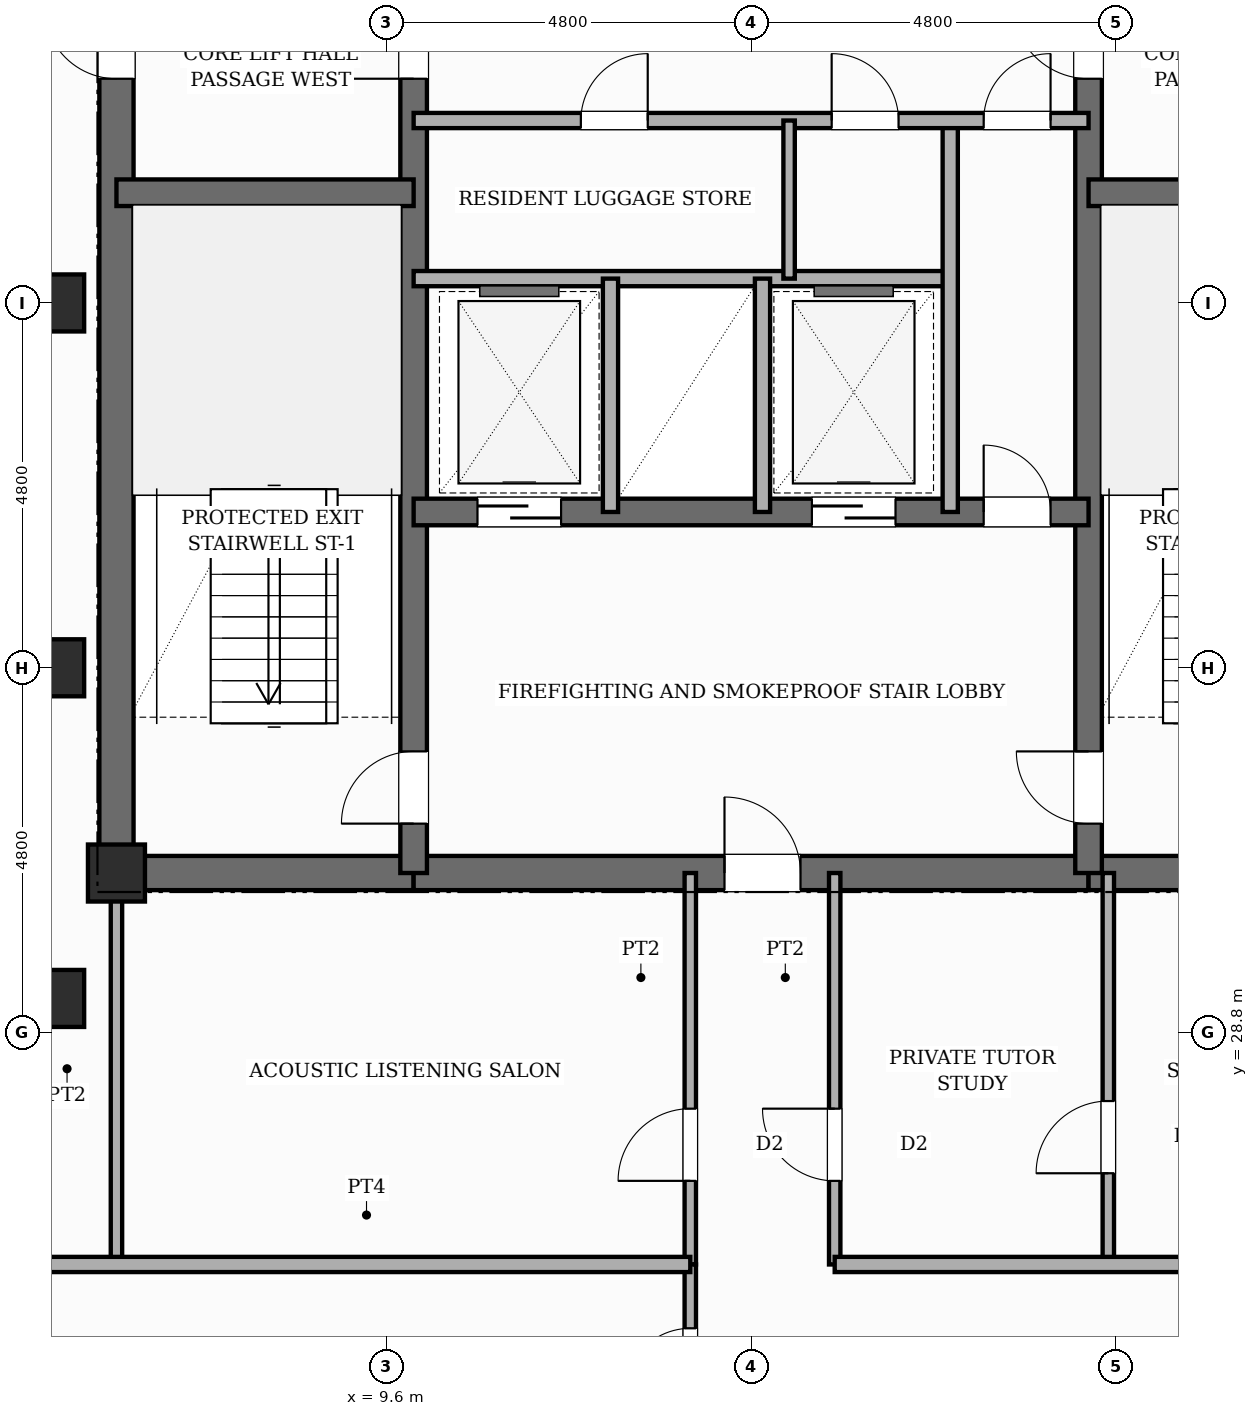
"""IFC4 building model, lengths in metres.
Left out: names, types, materials, properties, quantities, classifications, styles, units other than length and angle.
Written with IfcOpenShell. Run it as: python <this file> out.ifc"""

import sys

from ifc_helpers import new_model, si_unit, direction, frame, frame_2d, origin, origin_2d, place, context, subcontext, project, spatial, rectangle, extrude, element, fill, save


model = new_model("IFC4")
c1 = context("Model", 3, precision=1e-05, world=origin(), true_north=direction((0.0, 1.0)))
c2 = subcontext(c1, "Body", "Model", "MODEL_VIEW")
j1 = project(units=[si_unit("LENGTHUNIT", "METRE"), si_unit("PLANEANGLEUNIT", "RADIAN")], contexts=[c1])
p1 = place(None, origin())
s1 = spatial("IfcSite", under=j1, at=p1, CompositionType="ELEMENT")
p2 = place(p1, origin())
s2 = spatial("IfcBuilding", under=s1, at=p2, CompositionType="ELEMENT")
p3 = place(p2, frame((0.0, 0.0, 278.5)))
s3 = spatial("IfcBuildingStorey", under=s2, at=p3, CompositionType="ELEMENT", Elevation=278.5)
p4 = place(p3, frame((6.05, 30.675, 0.0), z_axis=(0.0, 0.0, 1.0), x_axis=(0.0, 1.0, 0.0)))
e1 = element("IfcWall", 1, at=p4, inside=s3, PredefinedType="SHEAR", context=c2, shape_type="SweptSolid", body=[
    extrude(rectangle(XDim=15.35, YDim=0.45, at=frame_2d((7.675, 0.0))), origin(), (0.0, 0.0, 1.0), 4.3),
])
p5 = place(p4, frame((10.675, 0.0, 0.0)))
e2 = element("IfcOpeningElement", 2, at=p5, cuts=e1, PredefinedType="OPENING", context=c2, shape_type="SweptSolid", body=[
    extrude(rectangle(XDim=0.95, YDim=2.15, at=frame_2d((0.475, 1.075))), frame((0.0, 0.235, 0.0), z_axis=(0.0, -1.0, 0.0), x_axis=(1.0, 0.0, 0.0)), (0.0, 0.0, 1.0), 0.47),
])
p6 = place(p3, frame((6.05, 30.9, 0.0), z_axis=(0.0, 0.0, 1.0), x_axis=(1.0, 0.0, 0.0)))
e3 = element("IfcWall", 3, at=p6, inside=s3, PredefinedType="SHEAR", context=c2, shape_type="SweptSolid", body=[
    extrude(rectangle(XDim=3.91, YDim=0.45, at=frame_2d((1.955, 0.0))), origin(), (0.0, 0.0, 1.0), 4.3),
])
p7 = place(p3, frame((9.96, 30.9, 0.0), z_axis=(0.0, 0.0, 1.0), x_axis=(1.0, 0.0, 0.0)))
e4 = element("IfcWall", 4, at=p7, inside=s3, PredefinedType="SHEAR", context=c2, shape_type="SweptSolid", body=[
    extrude(rectangle(XDim=8.88, YDim=0.45, at=frame_2d((4.44, 0.0))), origin(), (0.0, 0.0, 1.0), 4.3),
])
p8 = place(p7, frame((4.09, 0.0, 0.0)))
e5 = element("IfcOpeningElement", 5, at=p8, cuts=e4, PredefinedType="OPENING", context=c2, shape_type="SweptSolid", body=[
    extrude(rectangle(XDim=1.0, YDim=2.15, at=frame_2d((0.5, 1.075))), frame((0.0, 0.235, 0.0), z_axis=(0.0, -1.0, 0.0), x_axis=(1.0, 0.0, 0.0)), (0.0, 0.0, 1.0), 0.47),
])
p9 = place(p3, frame((18.84, 30.9, 0.0), z_axis=(0.0, 0.0, 1.0), x_axis=(1.0, 0.0, 0.0)))
e6 = element("IfcWall", 6, at=p9, inside=s3, PredefinedType="SHEAR", context=c2, shape_type="SweptSolid", body=[
    extrude(rectangle(XDim=3.91, YDim=0.45, at=frame_2d((1.955, 0.0))), origin(), (0.0, 0.0, 1.0), 4.3),
])
p10 = place(p3, frame((9.96, 30.9, 0.0), z_axis=(0.0, 0.0, 1.0), x_axis=(0.0, 1.0, 0.0)))
e7 = element("IfcWall", 7, at=p10, inside=s3, PredefinedType="SHEAR", context=c2, shape_type="SweptSolid", body=[
    extrude(rectangle(XDim=14.9, YDim=0.35, at=frame_2d((7.45, 0.0))), origin(), (0.0, 0.0, 1.0), 4.3),
])
p11 = place(p10, frame((0.65, 0.0, 0.0)))
e8 = element("IfcOpeningElement", 8, at=p11, cuts=e7, PredefinedType="OPENING", context=c2, shape_type="SweptSolid", body=[
    extrude(rectangle(XDim=0.95, YDim=2.1, at=frame_2d((0.475, 1.05))), frame((0.0, 0.185, 0.0), z_axis=(0.0, -1.0, 0.0), x_axis=(1.0, 0.0, 0.0)), (0.0, 0.0, 1.0), 0.37),
])
p12 = place(p10, frame((10.45, 0.0, 0.0)))
e9 = element("IfcOpeningElement", 9, at=p12, cuts=e7, PredefinedType="OPENING", context=c2, shape_type="SweptSolid", body=[
    extrude(rectangle(XDim=1.0, YDim=2.15, at=frame_2d((0.5, 1.075))), frame((0.0, 0.185, 0.0), z_axis=(0.0, -1.0, 0.0), x_axis=(1.0, 0.0, 0.0)), (0.0, 0.0, 1.0), 0.37),
])
p13 = place(p3, frame((18.84, 30.9, 0.0), z_axis=(0.0, 0.0, 1.0), x_axis=(0.0, 1.0, 0.0)))
e10 = element("IfcWall", 10, at=p13, inside=s3, PredefinedType="SHEAR", context=c2, shape_type="SweptSolid", body=[
    extrude(rectangle(XDim=14.9, YDim=0.35, at=frame_2d((7.45, 0.0))), origin(), (0.0, 0.0, 1.0), 4.3),
])
p14 = place(p13, frame((0.65, 0.0, 0.0)))
e11 = element("IfcOpeningElement", 11, at=p14, cuts=e10, PredefinedType="OPENING", context=c2, shape_type="SweptSolid", body=[
    extrude(rectangle(XDim=0.95, YDim=2.1, at=frame_2d((0.475, 1.05))), frame((0.0, 0.185, 0.0), z_axis=(0.0, -1.0, 0.0), x_axis=(1.0, 0.0, 0.0)), (0.0, 0.0, 1.0), 0.37),
])
p15 = place(p13, frame((10.45, 0.0, 0.0)))
e12 = element("IfcOpeningElement", 12, at=p15, cuts=e10, PredefinedType="OPENING", context=c2, shape_type="SweptSolid", body=[
    extrude(rectangle(XDim=1.0, YDim=2.15, at=frame_2d((0.5, 1.075))), frame((0.0, 0.185, 0.0), z_axis=(0.0, -1.0, 0.0), x_axis=(1.0, 0.0, 0.0)), (0.0, 0.0, 1.0), 0.37),
])
for number, where, z_axis, x_axis in (
    (13, (6.05, 39.85, 0.0), (0.0, 0.0, 1.0), (1.0, 0.0, 0.0)),
    (14, (18.84, 39.85, 0.0), (0.0, 0.0, 1.0), (1.0, 0.0, 0.0)),
):
    element("IfcWall", number, at=place(p3, frame(where, z_axis=z_axis, x_axis=x_axis)), inside=s3, PredefinedType="SHEAR", context=c2, shape_type="SweptSolid", body=[
        extrude(rectangle(XDim=3.91, YDim=0.35, at=frame_2d((1.955, 0.0))), origin(), (0.0, 0.0, 1.0), 4.3),
    ])
p16 = place(p3, frame((9.96, 35.65, 0.0), z_axis=(0.0, 0.0, 1.0), x_axis=(1.0, 0.0, 0.0)))
e15 = element("IfcWall", 15, at=p16, inside=s3, PredefinedType="SHEAR", context=c2, shape_type="SweptSolid", body=[
    extrude(rectangle(XDim=8.88, YDim=0.35, at=frame_2d((4.44, 0.0))), origin(), (0.0, 0.0, 1.0), 4.3),
])
p17 = place(p16, frame((0.84, 0.0, 0.0)))
e16 = element("IfcOpeningElement", 16, at=p17, cuts=e15, PredefinedType="OPENING", context=c2, shape_type="SweptSolid", body=[
    extrude(rectangle(XDim=1.1, YDim=2.15, at=frame_2d((0.55, 1.075))), frame((0.0, 0.185, 0.0), z_axis=(0.0, -1.0, 0.0), x_axis=(1.0, 0.0, 0.0)), (0.0, 0.0, 1.0), 0.37),
])
p18 = place(p16, frame((5.24, 0.0, 0.0)))
e17 = element("IfcOpeningElement", 17, at=p18, cuts=e15, PredefinedType="OPENING", context=c2, shape_type="SweptSolid", body=[
    extrude(rectangle(XDim=1.1, YDim=2.15, at=frame_2d((0.55, 1.075))), frame((0.0, 0.185, 0.0), z_axis=(0.0, -1.0, 0.0), x_axis=(1.0, 0.0, 0.0)), (0.0, 0.0, 1.0), 0.37),
])
p19 = place(p16, frame((7.5, 0.0, 0.0)))
e18 = element("IfcOpeningElement", 18, at=p19, cuts=e15, PredefinedType="OPENING", context=c2, shape_type="SweptSolid", body=[
    extrude(rectangle(XDim=0.88, YDim=2.1, at=frame_2d((0.44, 1.05))), frame((0.0, 0.185, 0.0), z_axis=(0.0, -1.0, 0.0), x_axis=(1.0, 0.0, 0.0)), (0.0, 0.0, 1.0), 0.37),
])
for number, where, z_axis, x_axis in (
    (19, (5.25, 29.25, 0.0), (0.0, 0.0, 1.0), (1.0, 0.0, 0.0)),
    (20, (5.25, 33.6, 0.0), (0.0, 0.0, 1.0), (1.0, 0.0, 0.0)),
    (21, (5.25, 38.4, 0.0), (0.0, 0.0, 1.0), (1.0, 0.0, 0.0)),
    (22, (6.05, 30.9, 0.0), (0.0, 0.0, 1.0), (1.0, 0.0, 0.0)),
):
    element("IfcColumn", number, at=place(p3, frame(where, z_axis=z_axis, x_axis=x_axis)), inside=s3, PredefinedType="COLUMN", context=c2, shape_type="SweptSolid", body=[
        extrude(rectangle(XDim=0.75, YDim=0.75, at=origin_2d()), origin(), (0.0, 0.0, 1.0), 4.3),
    ])
p20 = place(p3, frame((9.96, 38.72, 0.0), z_axis=(0.0, 0.0, 1.0), x_axis=(1.0, 0.0, 0.0)))
e23 = element("IfcWall", 23, at=p20, inside=s3, PredefinedType="POLYGONAL", context=c2, shape_type="SweptSolid", body=[
    extrude(rectangle(XDim=7.06, YDim=0.2, at=frame_2d((3.53, 0.0))), origin(), (0.0, 0.0, 1.0), 4.04),
])
for number, where, z_axis, x_axis in (
    (24, (12.55, 35.65, 0.0), (0.0, 0.0, 1.0), (0.0, 1.0, 0.0)),
    (25, (14.55, 35.65, 0.0), (0.0, 0.0, 1.0), (0.0, 1.0, 0.0)),
):
    element("IfcWall", number, at=place(p3, frame(where, z_axis=z_axis, x_axis=x_axis)), inside=s3, PredefinedType="POLYGONAL", context=c2, shape_type="SweptSolid", body=[
        extrude(rectangle(XDim=3.07, YDim=0.2, at=frame_2d((1.535, 0.0))), origin(), (0.0, 0.0, 1.0), 4.04),
    ])
p21 = place(p3, frame((17.02, 35.65, 0.0), z_axis=(0.0, 0.0, 1.0), x_axis=(0.0, 1.0, 0.0)))
e26 = element("IfcWall", 26, at=p21, inside=s3, PredefinedType="POLYGONAL", context=c2, shape_type="SweptSolid", body=[
    extrude(rectangle(XDim=5.15, YDim=0.2, at=frame_2d((2.575, 0.0))), origin(), (0.0, 0.0, 1.0), 4.04),
])
p22 = place(p3, frame((9.96, 40.8, 0.0), z_axis=(0.0, 0.0, 1.0), x_axis=(1.0, 0.0, 0.0)))
e27 = element("IfcWall", 27, at=p22, inside=s3, PredefinedType="POLYGONAL", context=c2, shape_type="SweptSolid", body=[
    extrude(rectangle(XDim=8.88, YDim=0.2, at=frame_2d((4.44, 0.0))), origin(), (0.0, 0.0, 1.0), 4.04),
])
p23 = place(p22, frame((7.5, 0.0, 0.0)))
e28 = element("IfcOpeningElement", 28, at=p23, cuts=e27, PredefinedType="OPENING", context=c2, shape_type="SweptSolid", body=[
    extrude(rectangle(XDim=0.88, YDim=2.1, at=frame_2d((0.44, 1.05))), frame((0.0, 0.11, 0.0), z_axis=(0.0, -1.0, 0.0), x_axis=(1.0, 0.0, 0.0)), (0.0, 0.0, 1.0), 0.22),
])
p24 = place(p22, frame((2.2, 0.0, 0.0)))
e29 = element("IfcOpeningElement", 29, at=p24, cuts=e27, PredefinedType="OPENING", context=c2, shape_type="SweptSolid", body=[
    extrude(rectangle(XDim=0.88, YDim=2.1, at=frame_2d((0.44, 1.05))), frame((0.0, 0.11, 0.0), z_axis=(0.0, -1.0, 0.0), x_axis=(1.0, 0.0, 0.0)), (0.0, 0.0, 1.0), 0.22),
])
p25 = place(p22, frame((5.5, 0.0, 0.0)))
e30 = element("IfcOpeningElement", 30, at=p25, cuts=e27, PredefinedType="OPENING", context=c2, shape_type="SweptSolid", body=[
    extrude(rectangle(XDim=0.88, YDim=2.1, at=frame_2d((0.44, 1.05))), frame((0.0, 0.11, 0.0), z_axis=(0.0, -1.0, 0.0), x_axis=(1.0, 0.0, 0.0)), (0.0, 0.0, 1.0), 0.22),
])
p26 = place(p3, frame((14.9, 38.72, 0.0), z_axis=(0.0, 0.0, 1.0), x_axis=(0.0, 1.0, 0.0)))
e31 = element("IfcWall", 31, at=p26, inside=s3, PredefinedType="PARTITIONING", context=c2, shape_type="SweptSolid", body=[
    extrude(rectangle(XDim=2.08, YDim=0.15, at=frame_2d((1.04, 0.0))), origin(), (0.0, 0.0, 1.0), 4.04),
])
p27 = place(p3, frame((13.6, 25.75, 0.0), z_axis=(0.0, 0.0, 1.0), x_axis=(0.0, 1.0, 0.0)))
e32 = element("IfcWall", 32, at=p27, inside=s3, PredefinedType="PARTITIONING", context=c2, shape_type="SweptSolid", body=[
    extrude(rectangle(XDim=5.15, YDim=0.15, at=frame_2d((2.575, 0.0))), origin(), (0.0, 0.0, 1.0), 4.04),
])
p28 = place(p27, frame((1.1, 0.0, 0.0)))
e33 = element("IfcOpeningElement", 33, at=p28, cuts=e32, PredefinedType="OPENING", context=c2, shape_type="SweptSolid", body=[
    extrude(rectangle(XDim=0.95, YDim=2.15, at=frame_2d((0.475, 1.075))), frame((0.0, 0.085, 0.0), z_axis=(0.0, -1.0, 0.0), x_axis=(1.0, 0.0, 0.0)), (0.0, 0.0, 1.0), 0.17),
])
p29 = place(p3, frame((15.5, 25.75, 0.0), z_axis=(0.0, 0.0, 1.0), x_axis=(0.0, 1.0, 0.0)))
e34 = element("IfcWall", 34, at=p29, inside=s3, PredefinedType="PARTITIONING", context=c2, shape_type="SweptSolid", body=[
    extrude(rectangle(XDim=5.15, YDim=0.15, at=frame_2d((2.575, 0.0))), origin(), (0.0, 0.0, 1.0), 4.04),
])
p30 = place(p29, frame((1.1, 0.0, 0.0)))
e35 = element("IfcOpeningElement", 35, at=p30, cuts=e34, PredefinedType="OPENING", context=c2, shape_type="SweptSolid", body=[
    extrude(rectangle(XDim=0.95, YDim=2.15, at=frame_2d((0.475, 1.075))), frame((0.0, 0.085, 0.0), z_axis=(0.0, -1.0, 0.0), x_axis=(1.0, 0.0, 0.0)), (0.0, 0.0, 1.0), 0.17),
])
p31 = place(p3, frame((6.05, 25.75, 0.0), z_axis=(0.0, 0.0, 1.0), x_axis=(0.0, 1.0, 0.0)))
e36 = element("IfcWall", 36, at=p31, inside=s3, PredefinedType="PARTITIONING", context=c2, shape_type="SweptSolid", body=[
    extrude(rectangle(XDim=5.15, YDim=0.15, at=frame_2d((2.575, 0.0))), origin(), (0.0, 0.0, 1.0), 4.04),
])
p32 = place(p3, frame((19.1, 25.75, 0.0), z_axis=(0.0, 0.0, 1.0), x_axis=(0.0, 1.0, 0.0)))
e37 = element("IfcWall", 37, at=p32, inside=s3, PredefinedType="PARTITIONING", context=c2, shape_type="SweptSolid", body=[
    extrude(rectangle(XDim=5.15, YDim=0.15, at=frame_2d((2.575, 0.0))), origin(), (0.0, 0.0, 1.0), 4.04),
])
p33 = place(p32, frame((1.2, 0.0, 0.0)))
e38 = element("IfcOpeningElement", 38, at=p33, cuts=e37, PredefinedType="OPENING", context=c2, shape_type="SweptSolid", body=[
    extrude(rectangle(XDim=0.95, YDim=2.15, at=frame_2d((0.475, 1.075))), frame((0.0, 0.085, 0.0), z_axis=(0.0, -1.0, 0.0), x_axis=(1.0, 0.0, 0.0)), (0.0, 0.0, 1.0), 0.17),
])
p34 = place(p3, frame((15.5, 25.75, 0.0), z_axis=(0.0, 0.0, 1.0), x_axis=(1.0, 0.0, 0.0)))
e39 = element("IfcWall", 39, at=p34, inside=s3, PredefinedType="PARTITIONING", context=c2, shape_type="SweptSolid", body=[
    extrude(rectangle(XDim=8.22, YDim=0.2, at=frame_2d((4.11, 0.0))), origin(), (0.0, 0.0, 1.0), 4.04),
])
p35 = place(p3, frame((13.6, 23.4, 0.0), z_axis=(0.0, 0.0, 1.0), x_axis=(0.0, 1.0, 0.0)))
e40 = element("IfcWall", 40, at=p35, inside=s3, PredefinedType="PARTITIONING", context=c2, shape_type="SweptSolid", body=[
    extrude(rectangle(XDim=2.35, YDim=0.15, at=frame_2d((1.175, 0.0))), origin(), (0.0, 0.0, 1.0), 4.04),
])
p36 = place(p35, frame((0.65, 0.0, 0.0)))
e41 = element("IfcOpeningElement", 41, at=p36, cuts=e40, PredefinedType="OPENING", context=c2, shape_type="SweptSolid", body=[
    extrude(rectangle(XDim=0.86, YDim=2.1, at=frame_2d((0.43, 1.05))), frame((0.0, 0.085, 0.0), z_axis=(0.0, -1.0, 0.0), x_axis=(1.0, 0.0, 0.0)), (0.0, 0.0, 1.0), 0.17),
])
p37 = place(p3, frame((5.08, 25.75, 0.0), z_axis=(0.0, 0.0, 1.0), x_axis=(1.0, 0.0, 0.0)))
e42 = element("IfcWall", 42, at=p37, inside=s3, PredefinedType="PARTITIONING", context=c2, shape_type="SweptSolid", body=[
    extrude(rectangle(XDim=8.52, YDim=0.2, at=frame_2d((4.26, 0.0))), origin(), (0.0, 0.0, 1.0), 4.04),
])
p38 = place(p11, origin())
e43 = element("IfcDoor", 43, at=p38, inside=s3, OperationType="SINGLE_SWING_LEFT", PredefinedType="DOOR", context=c2, shape_type="SweptSolid", body=[
    extrude(rectangle(XDim=0.95, YDim=2.1, at=frame_2d((0.475, 1.05))), frame((0.0, 0.025, 0.0), z_axis=(0.0, -1.0, 0.0), x_axis=(1.0, 0.0, 0.0)), (0.0, 0.0, 1.0), 0.05),
])
fill(e8, e43)
p39 = place(p14, origin())
e44 = element("IfcDoor", 44, at=p39, inside=s3, OperationType="SINGLE_SWING_RIGHT", PredefinedType="DOOR", context=c2, shape_type="SweptSolid", body=[
    extrude(rectangle(XDim=0.95, YDim=2.1, at=frame_2d((0.475, 1.05))), frame((0.0, 0.025, 0.0), z_axis=(0.0, -1.0, 0.0), x_axis=(1.0, 0.0, 0.0)), (0.0, 0.0, 1.0), 0.05),
])
fill(e11, e44)
p40 = place(p8, origin())
e45 = element("IfcDoor", 45, at=p40, inside=s3, OperationType="SINGLE_SWING_LEFT", PredefinedType="DOOR", context=c2, shape_type="SweptSolid", body=[
    extrude(rectangle(XDim=1.0, YDim=2.15, at=frame_2d((0.5, 1.075))), frame((0.0, 0.025, 0.0), z_axis=(0.0, -1.0, 0.0), x_axis=(1.0, 0.0, 0.0)), (0.0, 0.0, 1.0), 0.05),
])
fill(e5, e45)
p41 = place(p17, origin())
e46 = element("IfcDoor", 46, at=p41, inside=s3, OperationType="SLIDING_TO_LEFT", PredefinedType="DOOR", context=c2, shape_type="SweptSolid", body=[
    extrude(rectangle(XDim=1.1, YDim=2.15, at=frame_2d((0.55, 1.075))), frame((0.0, 0.025, 0.0), z_axis=(0.0, -1.0, 0.0), x_axis=(1.0, 0.0, 0.0)), (0.0, 0.0, 1.0), 0.05),
])
fill(e16, e46)
p42 = place(p18, origin())
e47 = element("IfcDoor", 47, at=p42, inside=s3, OperationType="SLIDING_TO_RIGHT", PredefinedType="DOOR", context=c2, shape_type="SweptSolid", body=[
    extrude(rectangle(XDim=1.1, YDim=2.15, at=frame_2d((0.55, 1.075))), frame((0.0, 0.025, 0.0), z_axis=(0.0, -1.0, 0.0), x_axis=(1.0, 0.0, 0.0)), (0.0, 0.0, 1.0), 0.05),
])
fill(e17, e47)
p43 = place(p19, origin())
e48 = element("IfcDoor", 48, at=p43, inside=s3, OperationType="SINGLE_SWING_LEFT", PredefinedType="DOOR", context=c2, shape_type="SweptSolid", body=[
    extrude(rectangle(XDim=0.88, YDim=2.1, at=frame_2d((0.44, 1.05))), frame((0.0, 0.025, 0.0), z_axis=(0.0, -1.0, 0.0), x_axis=(1.0, 0.0, 0.0)), (0.0, 0.0, 1.0), 0.05),
])
fill(e18, e48)
p44 = place(p23, origin())
e49 = element("IfcDoor", 49, at=p44, inside=s3, OperationType="SINGLE_SWING_RIGHT", PredefinedType="DOOR", context=c2, shape_type="SweptSolid", body=[
    extrude(rectangle(XDim=0.88, YDim=2.1, at=frame_2d((0.44, 1.05))), frame((0.0, 0.025, 0.0), z_axis=(0.0, -1.0, 0.0), x_axis=(1.0, 0.0, 0.0)), (0.0, 0.0, 1.0), 0.05),
])
fill(e28, e49)
p45 = place(p12, origin())
e50 = element("IfcDoor", 50, at=p45, inside=s3, OperationType="SINGLE_SWING_LEFT", PredefinedType="DOOR", context=c2, shape_type="SweptSolid", body=[
    extrude(rectangle(XDim=1.0, YDim=2.15, at=frame_2d((0.5, 1.075))), frame((0.0, 0.025, 0.0), z_axis=(0.0, -1.0, 0.0), x_axis=(1.0, 0.0, 0.0)), (0.0, 0.0, 1.0), 0.05),
])
fill(e9, e50)
p46 = place(p15, origin())
e51 = element("IfcDoor", 51, at=p46, inside=s3, OperationType="SINGLE_SWING_RIGHT", PredefinedType="DOOR", context=c2, shape_type="SweptSolid", body=[
    extrude(rectangle(XDim=1.0, YDim=2.15, at=frame_2d((0.5, 1.075))), frame((0.0, 0.025, 0.0), z_axis=(0.0, -1.0, 0.0), x_axis=(1.0, 0.0, 0.0)), (0.0, 0.0, 1.0), 0.05),
])
fill(e12, e51)
p47 = place(p5, origin())
e52 = element("IfcDoor", 52, at=p47, inside=s3, OperationType="SINGLE_SWING_RIGHT", PredefinedType="DOOR", context=c2, shape_type="SweptSolid", body=[
    extrude(rectangle(XDim=0.95, YDim=2.15, at=frame_2d((0.475, 1.075))), frame((0.0, 0.025, 0.0), z_axis=(0.0, -1.0, 0.0), x_axis=(1.0, 0.0, 0.0)), (0.0, 0.0, 1.0), 0.05),
])
fill(e2, e52)
p48 = place(p24, origin())
e53 = element("IfcDoor", 53, at=p48, inside=s3, OperationType="SINGLE_SWING_RIGHT", PredefinedType="DOOR", context=c2, shape_type="SweptSolid", body=[
    extrude(rectangle(XDim=0.88, YDim=2.1, at=frame_2d((0.44, 1.05))), frame((0.0, 0.025, 0.0), z_axis=(0.0, -1.0, 0.0), x_axis=(1.0, 0.0, 0.0)), (0.0, 0.0, 1.0), 0.05),
])
fill(e29, e53)
p49 = place(p25, origin())
e54 = element("IfcDoor", 54, at=p49, inside=s3, OperationType="SINGLE_SWING_LEFT", PredefinedType="DOOR", context=c2, shape_type="SweptSolid", body=[
    extrude(rectangle(XDim=0.88, YDim=2.1, at=frame_2d((0.44, 1.05))), frame((0.0, 0.025, 0.0), z_axis=(0.0, -1.0, 0.0), x_axis=(1.0, 0.0, 0.0)), (0.0, 0.0, 1.0), 0.05),
])
fill(e30, e54)
p50 = place(p28, origin())
e55 = element("IfcDoor", 55, at=p50, inside=s3, OperationType="SINGLE_SWING_LEFT", PredefinedType="DOOR", context=c2, shape_type="SweptSolid", body=[
    extrude(rectangle(XDim=0.95, YDim=2.15, at=frame_2d((0.475, 1.075))), frame((0.0, 0.025, 0.0), z_axis=(0.0, -1.0, 0.0), x_axis=(1.0, 0.0, 0.0)), (0.0, 0.0, 1.0), 0.05),
])
fill(e33, e55)
p51 = place(p30, origin())
e56 = element("IfcDoor", 56, at=p51, inside=s3, OperationType="SINGLE_SWING_RIGHT", PredefinedType="DOOR", context=c2, shape_type="SweptSolid", body=[
    extrude(rectangle(XDim=0.95, YDim=2.15, at=frame_2d((0.475, 1.075))), frame((0.0, 0.025, 0.0), z_axis=(0.0, -1.0, 0.0), x_axis=(1.0, 0.0, 0.0)), (0.0, 0.0, 1.0), 0.05),
])
fill(e35, e56)
p52 = place(p33, origin())
e57 = element("IfcDoor", 57, at=p52, inside=s3, OperationType="SINGLE_SWING_LEFT", PredefinedType="DOOR", context=c2, shape_type="SweptSolid", body=[
    extrude(rectangle(XDim=0.95, YDim=2.15, at=frame_2d((0.475, 1.075))), frame((0.0, 0.025, 0.0), z_axis=(0.0, -1.0, 0.0), x_axis=(1.0, 0.0, 0.0)), (0.0, 0.0, 1.0), 0.05),
])
fill(e38, e57)
p53 = place(p36, origin())
e58 = element("IfcDoor", 58, at=p53, inside=s3, OperationType="SINGLE_SWING_LEFT", PredefinedType="DOOR", context=c2, shape_type="SweptSolid", body=[
    extrude(rectangle(XDim=0.86, YDim=2.1, at=frame_2d((0.43, 1.05))), frame((0.0, 0.025, 0.0), z_axis=(0.0, -1.0, 0.0), x_axis=(1.0, 0.0, 0.0)), (0.0, 0.0, 1.0), 0.05),
])
fill(e41, e58)
save(model, sys.argv[1])
